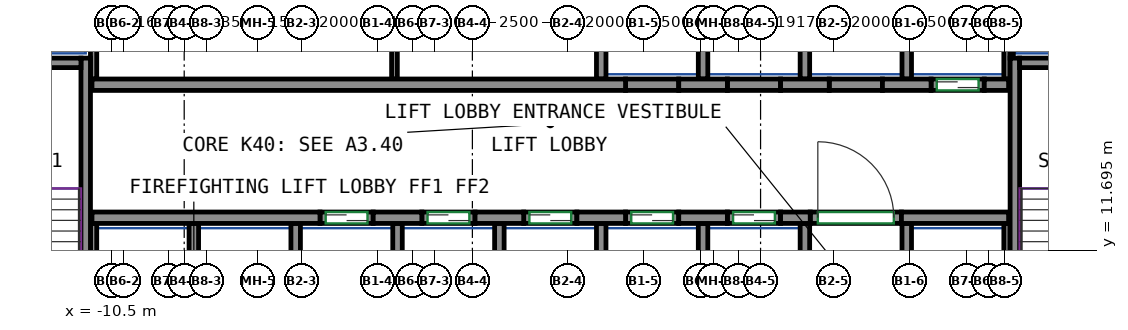
"""IFC4 building model, lengths in metres.
Left out: names, types, materials, properties, quantities, classifications, styles, units other than length and angle.
Written with IfcOpenShell. Run it as: python <this file> out.ifc"""

import sys

from ifc_helpers import new_model, si_unit, direction, frame, frame_2d, origin, place, context, subcontext, project, spatial, rectangle, extrude, source, transform, mapped, element, fill, save


model = new_model("IFC4")
c1 = context("Model", 3, precision=1e-05, world=origin(), true_north=direction((0.0, 1.0)))
c2 = subcontext(c1, "Body", "Model", "MODEL_VIEW")
j1 = project(units=[si_unit("LENGTHUNIT", "METRE"), si_unit("PLANEANGLEUNIT", "RADIAN")], contexts=[c1])
p1 = place(None, origin())
s1 = spatial("IfcSite", under=j1, at=p1, CompositionType="ELEMENT")
p2 = place(p1, origin())
s2 = spatial("IfcBuilding", under=s1, at=p2, CompositionType="ELEMENT")
p3 = place(p2, frame((0.0, 0.0, 168.5)))
s3 = spatial("IfcBuildingStorey", under=s2, at=p3, CompositionType="ELEMENT", Elevation=168.5)
m1 = source(origin(), c2, "Body", "SweptSolid", [
    extrude(rectangle(XDim=7.75, YDim=0.25, at=frame_2d((3.875, 0.0))), origin(), (0.0, 0.0, 1.0), 3.12),
])
p4 = place(p3, frame((-11.175, 9.0, 0.0), z_axis=(0.0, 0.0, 1.0), x_axis=(0.0, 1.0, 0.0)))
e1 = element("IfcWall", 1, at=p4, inside=s3, PredefinedType="SHEAR", context=c2, shape_type="MappedRepresentation", body=[
    mapped(m1, transform((0.0, 0.0, 0.0))),
])
m2 = source(origin(), c2, "Body", "SweptSolid", [
    extrude(rectangle(XDim=3.7, YDim=0.25, at=frame_2d((1.85, 0.0))), origin(), (0.0, 0.0, 1.0), 3.12),
])
p5 = place(p3, frame((-15.0, 16.625, 0.0), z_axis=(0.0, 0.0, 1.0), x_axis=(1.0, 0.0, 0.0)))
e2 = element("IfcWall", 2, at=p5, inside=s3, PredefinedType="SHEAR", context=c2, shape_type="MappedRepresentation", body=[
    mapped(m2, transform((0.0, 0.0, 0.0))),
])
p6 = place(p3, frame((13.275, 9.0, 0.0), z_axis=(0.0, 0.0, 1.0), x_axis=(0.0, 1.0, 0.0)))
e3 = element("IfcWall", 3, at=p6, inside=s3, PredefinedType="SHEAR", context=c2, shape_type="MappedRepresentation", body=[
    mapped(m1, transform((0.0, 0.0, 0.0))),
])
m3 = source(origin(), c2, "Body", "SweptSolid", [
    extrude(rectangle(XDim=3.7, YDim=0.25, at=frame_2d((1.85, 0.0))), origin(), (0.0, 0.0, 1.0), 3.12),
])
p7 = place(p3, frame((13.4, 16.625, 0.0), z_axis=(0.0, 0.0, 1.0), x_axis=(1.0, 0.0, 0.0)))
e4 = element("IfcWall", 4, at=p7, inside=s3, PredefinedType="SHEAR", context=c2, shape_type="MappedRepresentation", body=[
    mapped(m3, transform((0.0, 0.0, 0.0))),
])
m4 = source(origin(), c2, "Body", "SweptSolid", [
    extrude(rectangle(XDim=6.0, YDim=0.3, at=frame_2d((3.0, 0.0))), origin(), (0.0, 0.0, 1.0), 3.12),
])
p8 = place(p3, frame((-11.01, 12.55, 0.0), z_axis=(0.0, 0.0, 1.0), x_axis=(1.0, 0.0, 0.0)))
e5 = element("IfcWall", 5, at=p8, inside=s3, PredefinedType="SHEAR", context=c2, shape_type="MappedRepresentation", body=[
    mapped(m4, transform((0.0, 0.0, 0.0))),
])
m5 = source(origin(), c2, "Body", "SweptSolid", [
    extrude(rectangle(XDim=1.28, YDim=0.3, at=frame_2d((0.64, 0.0))), origin(), (0.0, 0.0, 1.0), 3.12),
])
for number, where, z_axis, x_axis in (
    (6, (-3.61, 12.55, 0.0), (0.0, 0.0, 1.0), (1.0, 0.0, 0.0)),
    (7, (-0.93, 12.55, 0.0), (0.0, 0.0, 1.0), (1.0, 0.0, 0.0)),
    (8, (1.75, 12.55, 0.0), (0.0, 0.0, 1.0), (1.0, 0.0, 0.0)),
    (9, (4.43, 12.55, 0.0), (0.0, 0.0, 1.0), (1.0, 0.0, 0.0)),
):
    element("IfcWall", number, at=place(p3, frame(where, z_axis=z_axis, x_axis=x_axis)), inside=s3, PredefinedType="SHEAR", context=c2, shape_type="MappedRepresentation", body=[
        mapped(m5, transform((0.0, 0.0, 0.0))),
    ])
m6 = source(origin(), c2, "Body", "SweptSolid", [
    extrude(rectangle(XDim=0.78, YDim=0.3, at=frame_2d((0.39, 0.0))), origin(), (0.0, 0.0, 1.0), 3.12),
])
p9 = place(p3, frame((7.11, 12.55, 0.0), z_axis=(0.0, 0.0, 1.0), x_axis=(1.0, 0.0, 0.0)))
e10 = element("IfcWall", 10, at=p9, inside=s3, PredefinedType="SHEAR", context=c2, shape_type="MappedRepresentation", body=[
    mapped(m6, transform((0.0, 0.0, 0.0))),
])
m7 = source(origin(), c2, "Body", "SweptSolid", [
    extrude(rectangle(XDim=2.82, YDim=0.3, at=frame_2d((1.41, 0.0))), origin(), (0.0, 0.0, 1.0), 3.12),
])
p10 = place(p3, frame((10.29, 12.55, 0.0), z_axis=(0.0, 0.0, 1.0), x_axis=(1.0, 0.0, 0.0)))
e11 = element("IfcWall", 11, at=p10, inside=s3, PredefinedType="SHEAR", context=c2, shape_type="MappedRepresentation", body=[
    mapped(m7, transform((0.0, 0.0, 0.0))),
])
m8 = source(origin(), c2, "Body", "SweptSolid", [
    extrude(rectangle(XDim=14.04, YDim=0.3, at=frame_2d((7.02, 0.0))), origin(), (0.0, 0.0, 1.0), 3.12),
])
p11 = place(p3, frame((-11.01, 16.05, 0.0), z_axis=(0.0, 0.0, 1.0), x_axis=(1.0, 0.0, 0.0)))
e12 = element("IfcWall", 12, at=p11, inside=s3, PredefinedType="SHEAR", context=c2, shape_type="MappedRepresentation", body=[
    mapped(m8, transform((0.0, 0.0, 0.0))),
])
p12 = place(p3, frame((4.43, 16.05, 0.0), z_axis=(0.0, 0.0, 1.0), x_axis=(1.0, 0.0, 0.0)))
e13 = element("IfcWall", 13, at=p12, inside=s3, PredefinedType="SHEAR", context=c2, shape_type="MappedRepresentation", body=[
    mapped(m5, transform((0.0, 0.0, 0.0))),
])
m9 = source(origin(), c2, "Body", "SweptSolid", [
    extrude(rectangle(XDim=1.28, YDim=0.3, at=frame_2d((0.64, 0.0))), origin(), (0.0, 0.0, 1.0), 3.12),
])
p13 = place(p3, frame((7.11, 16.05, 0.0), z_axis=(0.0, 0.0, 1.0), x_axis=(1.0, 0.0, 0.0)))
e14 = element("IfcWall", 14, at=p13, inside=s3, PredefinedType="SHEAR", context=c2, shape_type="MappedRepresentation", body=[
    mapped(m9, transform((0.0, 0.0, 0.0))),
])
p14 = place(p3, frame((9.79, 16.05, 0.0), z_axis=(0.0, 0.0, 1.0), x_axis=(1.0, 0.0, 0.0)))
e15 = element("IfcWall", 15, at=p14, inside=s3, PredefinedType="SHEAR", context=c2, shape_type="MappedRepresentation", body=[
    mapped(m5, transform((0.0, 0.0, 0.0))),
])
m10 = source(origin(), c2, "Body", "SweptSolid", [
    extrude(rectangle(XDim=0.64, YDim=0.3, at=frame_2d((0.32, 0.0))), origin(), (0.0, 0.0, 1.0), 3.12),
])
p15 = place(p3, frame((12.47, 16.05, 0.0), z_axis=(0.0, 0.0, 1.0), x_axis=(1.0, 0.0, 0.0)))
e16 = element("IfcWall", 16, at=p15, inside=s3, PredefinedType="SHEAR", context=c2, shape_type="MappedRepresentation", body=[
    mapped(m10, transform((0.0, 0.0, 0.0))),
])
m11 = source(origin(), c2, "Body", "SweptSolid", [
    extrude(rectangle(XDim=1.4, YDim=0.3, at=frame_2d((0.7, 0.0))), origin(), (0.0, 0.0, 1.0), 3.12),
])
p16 = place(p3, frame((-5.01, 12.55, 0.0), z_axis=(0.0, 0.0, 1.0), x_axis=(1.0, 0.0, 0.0)))
e17 = element("IfcWall", 17, at=p16, inside=s3, PredefinedType="PARTITIONING", context=c2, shape_type="MappedRepresentation", body=[
    mapped(m11, transform((0.0, 0.0, 0.0))),
])
p17 = place(p16, frame((0.15, 0.0, 0.0)))
e18 = element("IfcOpeningElement", 18, at=p17, cuts=e17, PredefinedType="OPENING", context=c2, shape_type="SweptSolid", body=[
    extrude(rectangle(XDim=1.1, YDim=2.1, at=frame_2d((0.55, 1.05))), frame((0.0, 0.16, 0.0), z_axis=(0.0, -1.0, 0.0), x_axis=(1.0, 0.0, 0.0)), (0.0, 0.0, 1.0), 0.32),
])
m12 = source(origin(), c2, "Body", "SweptSolid", [
    extrude(rectangle(XDim=1.4, YDim=0.3, at=frame_2d((0.7, 0.0))), origin(), (0.0, 0.0, 1.0), 3.12),
])
p18 = place(p3, frame((-2.33, 12.55, 0.0), z_axis=(0.0, 0.0, 1.0), x_axis=(1.0, 0.0, 0.0)))
e19 = element("IfcWall", 19, at=p18, inside=s3, PredefinedType="PARTITIONING", context=c2, shape_type="MappedRepresentation", body=[
    mapped(m12, transform((0.0, 0.0, 0.0))),
])
p19 = place(p18, frame((0.15, 0.0, 0.0)))
e20 = element("IfcOpeningElement", 20, at=p19, cuts=e19, PredefinedType="OPENING", context=c2, shape_type="SweptSolid", body=[
    extrude(rectangle(XDim=1.1, YDim=2.1, at=frame_2d((0.55, 1.05))), frame((0.0, 0.16, 0.0), z_axis=(0.0, -1.0, 0.0), x_axis=(1.0, 0.0, 0.0)), (0.0, 0.0, 1.0), 0.32),
])
p20 = place(p3, frame((0.35, 12.55, 0.0), z_axis=(0.0, 0.0, 1.0), x_axis=(1.0, 0.0, 0.0)))
e21 = element("IfcWall", 21, at=p20, inside=s3, PredefinedType="PARTITIONING", context=c2, shape_type="MappedRepresentation", body=[
    mapped(m11, transform((0.0, 0.0, 0.0))),
])
p21 = place(p20, frame((0.15, 0.0, 0.0)))
e22 = element("IfcOpeningElement", 22, at=p21, cuts=e21, PredefinedType="OPENING", context=c2, shape_type="SweptSolid", body=[
    extrude(rectangle(XDim=1.1, YDim=2.1, at=frame_2d((0.55, 1.05))), frame((0.0, 0.16, 0.0), z_axis=(0.0, -1.0, 0.0), x_axis=(1.0, 0.0, 0.0)), (0.0, 0.0, 1.0), 0.32),
])
p22 = place(p3, frame((3.03, 12.55, 0.0), z_axis=(0.0, 0.0, 1.0), x_axis=(1.0, 0.0, 0.0)))
e23 = element("IfcWall", 23, at=p22, inside=s3, PredefinedType="PARTITIONING", context=c2, shape_type="MappedRepresentation", body=[
    mapped(m11, transform((0.0, 0.0, 0.0))),
])
p23 = place(p22, frame((0.15, 0.0, 0.0)))
e24 = element("IfcOpeningElement", 24, at=p23, cuts=e23, PredefinedType="OPENING", context=c2, shape_type="SweptSolid", body=[
    extrude(rectangle(XDim=1.1, YDim=2.1, at=frame_2d((0.55, 1.05))), frame((0.0, 0.16, 0.0), z_axis=(0.0, -1.0, 0.0), x_axis=(1.0, 0.0, 0.0)), (0.0, 0.0, 1.0), 0.32),
])
p24 = place(p3, frame((5.71, 12.55, 0.0), z_axis=(0.0, 0.0, 1.0), x_axis=(1.0, 0.0, 0.0)))
e25 = element("IfcWall", 25, at=p24, inside=s3, PredefinedType="PARTITIONING", context=c2, shape_type="MappedRepresentation", body=[
    mapped(m12, transform((0.0, 0.0, 0.0))),
])
p25 = place(p24, frame((0.15, 0.0, 0.0)))
e26 = element("IfcOpeningElement", 26, at=p25, cuts=e25, PredefinedType="OPENING", context=c2, shape_type="SweptSolid", body=[
    extrude(rectangle(XDim=1.1, YDim=2.1, at=frame_2d((0.55, 1.05))), frame((0.0, 0.16, 0.0), z_axis=(0.0, -1.0, 0.0), x_axis=(1.0, 0.0, 0.0)), (0.0, 0.0, 1.0), 0.32),
])
p26 = place(p3, frame((11.07, 16.05, 0.0), z_axis=(0.0, 0.0, 1.0), x_axis=(1.0, 0.0, 0.0)))
e27 = element("IfcWall", 27, at=p26, inside=s3, PredefinedType="PARTITIONING", context=c2, shape_type="MappedRepresentation", body=[
    mapped(m11, transform((0.0, 0.0, 0.0))),
])
p27 = place(p26, frame((0.15, 0.0, 0.0)))
e28 = element("IfcOpeningElement", 28, at=p27, cuts=e27, PredefinedType="OPENING", context=c2, shape_type="SweptSolid", body=[
    extrude(rectangle(XDim=1.1, YDim=2.1, at=frame_2d((0.55, 1.05))), frame((0.0, 0.16, 0.0), z_axis=(0.0, -1.0, 0.0), x_axis=(1.0, 0.0, 0.0)), (0.0, 0.0, 1.0), 0.32),
])
m13 = source(origin(), c2, "Body", "SweptSolid", [
    extrude(rectangle(XDim=2.4, YDim=0.3, at=frame_2d((1.2, 0.0))), origin(), (0.0, 0.0, 1.0), 3.12),
])
p28 = place(p3, frame((7.89, 12.55, 0.0), z_axis=(0.0, 0.0, 1.0), x_axis=(1.0, 0.0, 0.0)))
e29 = element("IfcWall", 29, at=p28, inside=s3, PredefinedType="PARTITIONING", context=c2, shape_type="MappedRepresentation", body=[
    mapped(m13, transform((0.0, 0.0, 0.0))),
])
p29 = place(p28, frame((0.2, 0.0, 0.0)))
e30 = element("IfcOpeningElement", 30, at=p29, cuts=e29, PredefinedType="OPENING", context=c2, shape_type="SweptSolid", body=[
    extrude(rectangle(XDim=2.0, YDim=2.1, at=frame_2d((1.0, 1.05))), frame((0.0, 0.16, 0.0), z_axis=(0.0, -1.0, 0.0), x_axis=(1.0, 0.0, 0.0)), (0.0, 0.0, 1.0), 0.32),
])
p30 = place(p3, frame((3.03, 16.05, 0.0), z_axis=(0.0, 0.0, 1.0), x_axis=(1.0, 0.0, 0.0)))
e31 = element("IfcWall", 31, at=p30, inside=s3, PredefinedType="PARTITIONING", context=c2, shape_type="MappedRepresentation", body=[
    mapped(m11, transform((0.0, 0.0, 0.0))),
])
for number, where, z_axis, x_axis in (
    (32, (5.71, 16.05, 0.0), (0.0, 0.0, 1.0), (1.0, 0.0, 0.0)),
    (33, (8.39, 16.05, 0.0), (0.0, 0.0, 1.0), (1.0, 0.0, 0.0)),
):
    element("IfcWall", number, at=place(p3, frame(where, z_axis=z_axis, x_axis=x_axis)), inside=s3, PredefinedType="PARTITIONING", context=c2, shape_type="MappedRepresentation", body=[
        mapped(m12, transform((0.0, 0.0, 0.0))),
    ])
m14 = source(origin(), c2, "Body", "SweptSolid", [
    extrude(rectangle(XDim=3.275, YDim=0.165, at=frame_2d((1.638, 0.0))), origin(), (0.0, 0.0, 1.0), 3.12),
])
p31 = place(p3, frame((13.067, 16.2, 0.0), z_axis=(0.0, 0.0, 1.0), x_axis=(0.0, 1.0, 0.0)))
e34 = element("IfcWall", 34, at=p31, inside=s3, PredefinedType="PARTITIONING", context=c2, shape_type="MappedRepresentation", body=[
    mapped(m14, transform((0.0, 0.0, 0.0))),
])
m15 = source(origin(), c2, "Body", "SweptSolid", [
    extrude(rectangle(XDim=4.8, YDim=0.165, at=frame_2d((2.4, 0.0))), origin(), (0.0, 0.0, 1.0), 3.12),
])
p32 = place(p3, frame((-10.968, 16.2, 0.0), z_axis=(0.0, 0.0, 1.0), x_axis=(0.0, 1.0, 0.0)))
e35 = element("IfcWall", 35, at=p32, inside=s3, PredefinedType="PARTITIONING", context=c2, shape_type="MappedRepresentation", body=[
    mapped(m15, transform((0.0, 0.0, 0.0))),
])
m16 = source(origin(), c2, "Body", "SweptSolid", [
    extrude(rectangle(XDim=3.275, YDim=0.25, at=frame_2d((1.638, 0.0))), origin(), (0.0, 0.0, 1.0), 3.12),
])
p33 = place(p3, frame((10.43, 16.2, 0.0), z_axis=(0.0, 0.0, 1.0), x_axis=(0.0, 1.0, 0.0)))
e36 = element("IfcWall", 36, at=p33, inside=s3, PredefinedType="PARTITIONING", context=c2, shape_type="MappedRepresentation", body=[
    mapped(m16, transform((0.0, 0.0, 0.0))),
])
m17 = source(origin(), c2, "Body", "SweptSolid", [
    extrude(rectangle(XDim=2.725, YDim=0.085, at=frame_2d((1.363, 0.0))), origin(), (0.0, 0.0, 1.0), 3.12),
])
p34 = place(p3, frame((13.192, 16.75, 0.0), z_axis=(0.0, 0.0, 1.0), x_axis=(0.0, 1.0, 0.0)))
e37 = element("IfcWall", 37, at=p34, inside=s3, PredefinedType="PARTITIONING", context=c2, shape_type="MappedRepresentation", body=[
    mapped(m17, transform((0.0, 0.0, 0.0))),
])
for number, where, z_axis, x_axis in (
    (38, (2.39, 16.2, 0.0), (0.0, 0.0, 1.0), (0.0, 1.0, 0.0)),
    (39, (5.07, 16.2, 0.0), (0.0, 0.0, 1.0), (0.0, 1.0, 0.0)),
    (40, (7.75, 16.2, 0.0), (0.0, 0.0, 1.0), (0.0, 1.0, 0.0)),
):
    element("IfcWall", number, at=place(p3, frame(where, z_axis=z_axis, x_axis=x_axis)), inside=s3, PredefinedType="PARTITIONING", context=c2, shape_type="MappedRepresentation", body=[
        mapped(m16, transform((0.0, 0.0, 0.0))),
    ])
m18 = source(origin(), c2, "Body", "SweptSolid", [
    extrude(rectangle(XDim=3.4, YDim=0.25, at=frame_2d((1.7, 0.0))), origin(), (0.0, 0.0, 1.0), 3.12),
])
p35 = place(p3, frame((10.43, 9.0, 0.0), z_axis=(0.0, 0.0, 1.0), x_axis=(0.0, 1.0, 0.0)))
e41 = element("IfcWall", 41, at=p35, inside=s3, PredefinedType="PARTITIONING", context=c2, shape_type="MappedRepresentation", body=[
    mapped(m18, transform((0.0, 0.0, 0.0))),
])
m19 = source(origin(), c2, "Body", "SweptSolid", [
    extrude(rectangle(XDim=3.4, YDim=0.165, at=frame_2d((1.7, 0.0))), origin(), (0.0, 0.0, 1.0), 3.12),
])
p36 = place(p3, frame((13.067, 9.0, 0.0), z_axis=(0.0, 0.0, 1.0), x_axis=(0.0, 1.0, 0.0)))
e42 = element("IfcWall", 42, at=p36, inside=s3, PredefinedType="PARTITIONING", context=c2, shape_type="MappedRepresentation", body=[
    mapped(m19, transform((0.0, 0.0, 0.0))),
])
for number, where, z_axis, x_axis in (
    (43, (2.39, 9.0, 0.0), (0.0, 0.0, 1.0), (0.0, 1.0, 0.0)),
    (44, (5.07, 9.0, 0.0), (0.0, 0.0, 1.0), (0.0, 1.0, 0.0)),
    (45, (7.75, 9.0, 0.0), (0.0, 0.0, 1.0), (0.0, 1.0, 0.0)),
    (46, (-0.29, 9.0, 0.0), (0.0, 0.0, 1.0), (0.0, 1.0, 0.0)),
):
    element("IfcWall", number, at=place(p3, frame(where, z_axis=z_axis, x_axis=x_axis)), inside=s3, PredefinedType="PARTITIONING", context=c2, shape_type="MappedRepresentation", body=[
        mapped(m18, transform((0.0, 0.0, 0.0))),
    ])
p37 = place(p3, frame((-10.968, 9.0, 0.0), z_axis=(0.0, 0.0, 1.0), x_axis=(0.0, 1.0, 0.0)))
e47 = element("IfcWall", 47, at=p37, inside=s3, PredefinedType="PARTITIONING", context=c2, shape_type="MappedRepresentation", body=[
    mapped(m19, transform((0.0, 0.0, 0.0))),
])
for number, where, z_axis, x_axis in (
    (48, (-2.97, 9.0, 0.0), (0.0, 0.0, 1.0), (0.0, 1.0, 0.0)),
    (49, (-5.65, 9.0, 0.0), (0.0, 0.0, 1.0), (0.0, 1.0, 0.0)),
    (50, (-8.33, 9.0, 0.0), (0.0, 0.0, 1.0), (0.0, 1.0, 0.0)),
):
    element("IfcWall", number, at=place(p3, frame(where, z_axis=z_axis, x_axis=x_axis)), inside=s3, PredefinedType="PARTITIONING", context=c2, shape_type="MappedRepresentation", body=[
        mapped(m18, transform((0.0, 0.0, 0.0))),
    ])
m20 = source(origin(), c2, "Body", "SweptSolid", [
    extrude(rectangle(XDim=4.8, YDim=0.15, at=frame_2d((2.4, 0.0))), origin(), (0.0, 0.0, 1.0), 3.12),
])
p38 = place(p3, frame((-3.05, 16.2, 0.0), z_axis=(0.0, 0.0, 1.0), x_axis=(0.0, 1.0, 0.0)))
e51 = element("IfcWall", 51, at=p38, inside=s3, PredefinedType="PARTITIONING", context=c2, shape_type="MappedRepresentation", body=[
    mapped(m20, transform((0.0, 0.0, 0.0))),
])
p39 = place(p29, origin())
e52 = element("IfcDoor", 52, at=p39, inside=s3, OperationType="DOUBLE_DOOR_SINGLE_SWING", PredefinedType="DOOR", context=c2, shape_type="SweptSolid", body=[
    extrude(rectangle(XDim=2.0, YDim=2.1, at=frame_2d((1.0, 1.05))), frame((0.0, 0.025, 0.0), z_axis=(0.0, -1.0, 0.0), x_axis=(1.0, 0.0, 0.0)), (0.0, 0.0, 1.0), 0.05),
])
fill(e30, e52)
p40 = place(p17, origin())
e53 = element("IfcDoor", 53, at=p40, inside=s3, OperationType="DOUBLE_DOOR_SLIDING", PredefinedType="DOOR", context=c2, shape_type="SweptSolid", body=[
    extrude(rectangle(XDim=1.1, YDim=2.1, at=frame_2d((0.55, 1.05))), frame((0.0, 0.025, 0.0), z_axis=(0.0, -1.0, 0.0), x_axis=(1.0, 0.0, 0.0)), (0.0, 0.0, 1.0), 0.05),
])
fill(e18, e53)
p41 = place(p19, origin())
e54 = element("IfcDoor", 54, at=p41, inside=s3, OperationType="DOUBLE_DOOR_SLIDING", PredefinedType="DOOR", context=c2, shape_type="SweptSolid", body=[
    extrude(rectangle(XDim=1.1, YDim=2.1, at=frame_2d((0.55, 1.05))), frame((0.0, 0.025, 0.0), z_axis=(0.0, -1.0, 0.0), x_axis=(1.0, 0.0, 0.0)), (0.0, 0.0, 1.0), 0.05),
])
fill(e20, e54)
p42 = place(p21, origin())
e55 = element("IfcDoor", 55, at=p42, inside=s3, OperationType="DOUBLE_DOOR_SLIDING", PredefinedType="DOOR", context=c2, shape_type="SweptSolid", body=[
    extrude(rectangle(XDim=1.1, YDim=2.1, at=frame_2d((0.55, 1.05))), frame((0.0, 0.025, 0.0), z_axis=(0.0, -1.0, 0.0), x_axis=(1.0, 0.0, 0.0)), (0.0, 0.0, 1.0), 0.05),
])
fill(e22, e55)
p43 = place(p23, origin())
e56 = element("IfcDoor", 56, at=p43, inside=s3, OperationType="DOUBLE_DOOR_SLIDING", PredefinedType="DOOR", context=c2, shape_type="SweptSolid", body=[
    extrude(rectangle(XDim=1.1, YDim=2.1, at=frame_2d((0.55, 1.05))), frame((0.0, 0.025, 0.0), z_axis=(0.0, -1.0, 0.0), x_axis=(1.0, 0.0, 0.0)), (0.0, 0.0, 1.0), 0.05),
])
fill(e24, e56)
p44 = place(p25, origin())
e57 = element("IfcDoor", 57, at=p44, inside=s3, OperationType="DOUBLE_DOOR_SLIDING", PredefinedType="DOOR", context=c2, shape_type="SweptSolid", body=[
    extrude(rectangle(XDim=1.1, YDim=2.1, at=frame_2d((0.55, 1.05))), frame((0.0, 0.025, 0.0), z_axis=(0.0, -1.0, 0.0), x_axis=(1.0, 0.0, 0.0)), (0.0, 0.0, 1.0), 0.05),
])
fill(e26, e57)
p45 = place(p27, origin())
e58 = element("IfcDoor", 58, at=p45, inside=s3, OperationType="DOUBLE_DOOR_SLIDING", PredefinedType="DOOR", context=c2, shape_type="SweptSolid", body=[
    extrude(rectangle(XDim=1.1, YDim=2.1, at=frame_2d((0.55, 1.05))), frame((0.0, 0.025, 0.0), z_axis=(0.0, -1.0, 0.0), x_axis=(1.0, 0.0, 0.0)), (0.0, 0.0, 1.0), 0.05),
])
fill(e28, e58)
save(model, sys.argv[1])
